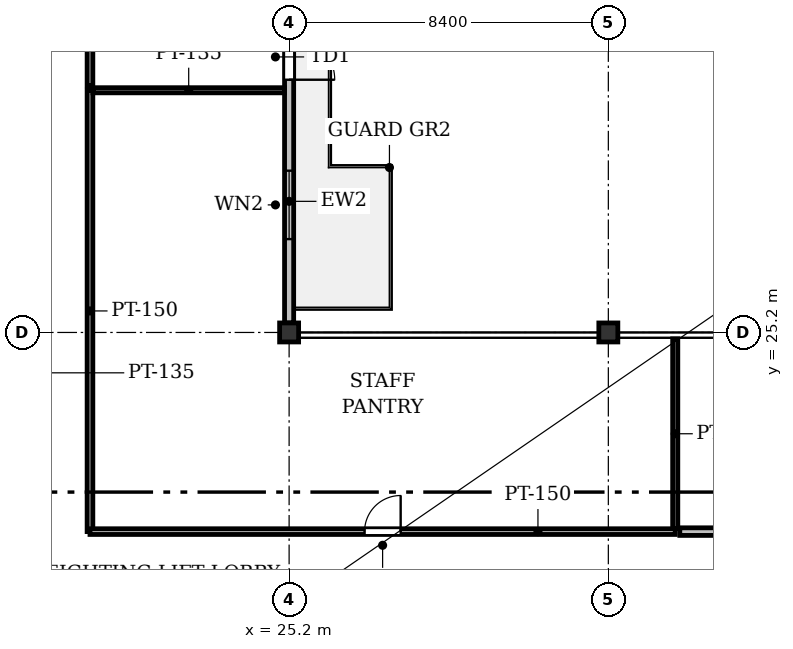
"""IFC4 building model, lengths in metres.
Left out: names, types, materials, properties, quantities, classifications, styles, units other than length and angle.
Written with IfcOpenShell. Run it as: python <this file> out.ifc"""

import sys

from ifc_helpers import new_model, si_unit, direction, frame, frame_2d, origin, origin_2d, place, context, subcontext, project, spatial, rectangle, i_section, extrude, element, fill, save


model = new_model("IFC4")
c1 = context("Model", 3, precision=1e-05, world=origin(), true_north=direction((0.0, 1.0)))
c2 = subcontext(c1, "Body", "Model", "MODEL_VIEW")
j1 = project(units=[si_unit("LENGTHUNIT", "METRE"), si_unit("PLANEANGLEUNIT", "RADIAN")], contexts=[c1])
p1 = place(None, origin())
s1 = spatial("IfcSite", under=j1, at=p1, CompositionType="ELEMENT")
p2 = place(p1, origin())
s2 = spatial("IfcBuilding", under=s1, at=p2, CompositionType="ELEMENT")
p3 = place(p2, frame((0.0, 0.0, 24.8)))
s3 = spatial("IfcBuildingStorey", under=s2, at=p3, CompositionType="ELEMENT", Elevation=24.8)
for number, where, z_axis, x_axis in (
    (1, (25.2, 25.2, 0.0), (0.0, 0.0, 1.0), (1.0, 0.0, 0.0)),
    (2, (33.6, 25.2, 0.0), (0.0, 0.0, 1.0), (1.0, 0.0, 0.0)),
):
    element("IfcColumn", number, at=place(p3, frame(where, z_axis=z_axis, x_axis=x_axis)), inside=s3, PredefinedType="COLUMN", context=c2, shape_type="SweptSolid", body=[
        extrude(i_section(OverallWidth=0.5, OverallDepth=0.5, WebThickness=0.028, FlangeThickness=0.04, at=origin_2d()), origin(), (0.0, 0.0, 1.0), 4.2),
    ])
p4 = place(p3, frame((25.2, 33.35, 0.0), z_axis=(0.0, 0.0, 1.0), x_axis=(0.0, -1.0, 0.0)))
e3 = element("IfcWall", 3, at=p4, inside=s3, PredefinedType="STANDARD", context=c2, shape_type="SweptSolid", body=[
    extrude(rectangle(XDim=7.9, YDim=0.24, at=frame_2d((3.95, 0.0))), origin(), (0.0, 0.0, 1.0), 3.471),
])
p5 = place(p4, frame((0.3, 0.0, 0.0)))
e4 = element("IfcOpeningElement", 4, at=p5, cuts=e3, PredefinedType="OPENING", context=c2, shape_type="SweptSolid", body=[
    extrude(rectangle(XDim=1.2, YDim=2.2, at=frame_2d((0.6, 1.1))), frame((0.0, 0.13, 0.0), z_axis=(0.0, -1.0, 0.0), x_axis=(1.0, 0.0, 0.0)), (0.0, 0.0, 1.0), 0.26),
])
p6 = place(p4, frame((3.894, 0.0, 0.9)))
e5 = element("IfcOpeningElement", 5, at=p6, cuts=e3, PredefinedType="OPENING", context=c2, shape_type="SweptSolid", body=[
    extrude(rectangle(XDim=1.8, YDim=1.6, at=frame_2d((0.9, 0.8))), frame((0.0, 0.13, 0.0), z_axis=(0.0, -1.0, 0.0), x_axis=(1.0, 0.0, 0.0)), (0.0, 0.0, 1.0), 0.26),
])
p7 = place(p3, frame((19.96, 31.573, 0.0), z_axis=(0.0, 0.0, 1.0), x_axis=(0.0, -1.0, 0.0)))
e6 = element("IfcWall", 6, at=p7, inside=s3, PredefinedType="PARTITIONING", context=c2, shape_type="SweptSolid", body=[
    extrude(rectangle(XDim=11.613, YDim=0.15, at=frame_2d((5.806, 0.0))), origin(), (0.0, 0.0, 1.0), 3.313),
])
p8 = place(p3, frame((19.96, 19.96, 0.0), z_axis=(0.0, 0.0, 1.0), x_axis=(0.999999999874, -1.5852885e-05, 0.0)))
e7 = element("IfcWall", 7, at=p8, inside=s3, PredefinedType="PARTITIONING", context=c2, shape_type="SweptSolid", body=[
    extrude(rectangle(XDim=15.4, YDim=0.15, at=frame_2d((7.7, 0.0))), origin(), (0.0, 0.0, 1.0), 3.323),
])
p9 = place(p8, frame((7.225, 0.0, 0.0)))
e8 = element("IfcOpeningElement", 8, at=p9, cuts=e7, PredefinedType="OPENING", context=c2, shape_type="SweptSolid", body=[
    extrude(rectangle(XDim=0.95, YDim=2.15, at=frame_2d((0.475, 1.075))), frame((0.0, 0.085, 0.0), z_axis=(0.0, -1.0, 0.0), x_axis=(1.0, 0.0, 0.0)), (0.0, 0.0, 1.0), 0.17),
])
p10 = place(p3, frame((35.36, 20.039, 0.0), z_axis=(0.0, 0.0, 1.0), x_axis=(0.0, 1.0, 0.0)))
e9 = element("IfcWall", 9, at=p10, inside=s3, PredefinedType="PARTITIONING", context=c2, shape_type="SweptSolid", body=[
    extrude(rectangle(XDim=4.992, YDim=0.135, at=frame_2d((2.496, 0.0))), origin(), (0.0, 0.0, 1.0), 3.925),
])
p11 = place(p3, frame((25.076, 31.573, 0.0), z_axis=(0.0, 0.0, 1.0), x_axis=(-1.0, 0.0, 0.0)))
e10 = element("IfcWall", 10, at=p11, inside=s3, PredefinedType="PARTITIONING", context=c2, shape_type="SweptSolid", body=[
    extrude(rectangle(XDim=5.037, YDim=0.135, at=frame_2d((2.519, 0.0))), origin(), (0.0, 0.0, 1.0), 3.566),
])
p12 = place(p3, frame((19.96, 45.2, 0.0), z_axis=(0.0, 0.0, 1.0), x_axis=(0.0, -1.0, 0.0)))
e11 = element("IfcWall", 11, at=p12, inside=s3, PredefinedType="PARTITIONING", context=c2, shape_type="SweptSolid", body=[
    extrude(rectangle(XDim=13.507, YDim=0.15, at=frame_2d((6.753, 0.0))), origin(), (0.0, 0.0, 1.0), 3.313),
])
p13 = place(p12, frame((6.279, 0.0, 0.0)))
e12 = element("IfcOpeningElement", 12, at=p13, cuts=e11, PredefinedType="OPENING", context=c2, shape_type="SweptSolid", body=[
    extrude(rectangle(XDim=0.95, YDim=2.15, at=frame_2d((0.475, 1.075))), frame((0.0, 0.085, 0.0), z_axis=(0.0, -1.0, 0.0), x_axis=(1.0, 0.0, 0.0)), (0.0, 0.0, 1.0), 0.17),
])
p14 = place(p3, frame((35.48, 19.96, 0.0), z_axis=(0.0, 0.0, 1.0), x_axis=(1.0, 0.0, 0.0)))
e13 = element("IfcWall", 13, at=p14, inside=s3, PredefinedType="PARTITIONING", context=c2, shape_type="SweptSolid", body=[
    extrude(rectangle(XDim=9.725, YDim=0.2, at=frame_2d((4.863, 0.0))), origin(), (0.0, 0.0, 1.0), 3.323),
])
p15 = place(p5, origin())
e14 = element("IfcDoor", 14, at=p15, inside=s3, OperationType="SINGLE_SWING_RIGHT", PredefinedType="DOOR", context=c2, shape_type="SweptSolid", body=[
    extrude(rectangle(XDim=1.2, YDim=2.2, at=frame_2d((0.6, 1.1))), frame((0.0, 0.025, 0.0), z_axis=(0.0, -1.0, 0.0), x_axis=(1.0, 0.0, 0.0)), (0.0, 0.0, 1.0), 0.05),
])
fill(e4, e14)
p16 = place(p6, origin())
e15 = element("IfcWindow", 15, at=p16, inside=s3, PartitioningType="SINGLE_PANEL", PredefinedType="WINDOW", context=c2, shape_type="SweptSolid", body=[
    extrude(rectangle(XDim=1.8, YDim=1.6, at=frame_2d((0.9, 0.8))), frame((0.0, 0.03, 0.0), z_axis=(0.0, -1.0, 0.0), x_axis=(1.0, 0.0, 0.0)), (0.0, 0.0, 1.0), 0.06),
])
fill(e5, e15)
p17 = place(p9, origin())
e16 = element("IfcDoor", 16, at=p17, inside=s3, OperationType="SINGLE_SWING_RIGHT", PredefinedType="DOOR", context=c2, shape_type="SweptSolid", body=[
    extrude(rectangle(XDim=0.95, YDim=2.15, at=frame_2d((0.475, 1.075))), frame((0.0, 0.025, 0.0), z_axis=(0.0, -1.0, 0.0), x_axis=(1.0, 0.0, 0.0)), (0.0, 0.0, 1.0), 0.05),
])
fill(e8, e16)
save(model, sys.argv[1])
